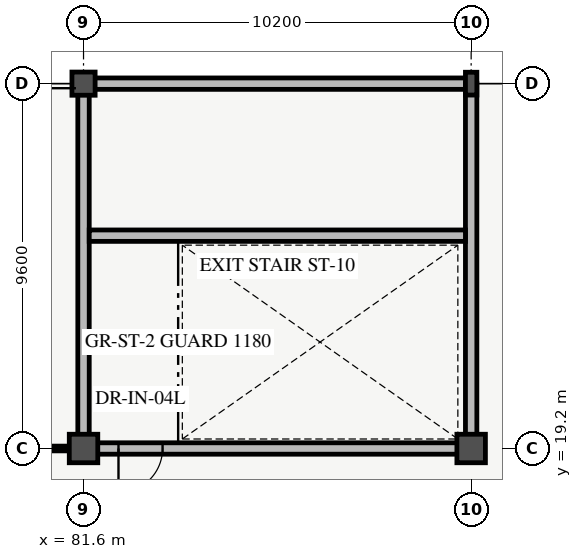
"""IFC4 building model, lengths in metres.
Left out: names, types, materials, properties, quantities, classifications, styles, units other than length and angle.
Written with IfcOpenShell. Run it as: python <this file> out.ifc"""

import sys

from ifc_helpers import new_model, si_unit, direction, frame, frame_2d, origin, origin_2d, place, context, subcontext, project, spatial, rectangle, hollow_circle, i_section, extrude, element, fill, save


model = new_model("IFC4")
c1 = context("Model", 3, precision=1e-05, world=origin(), true_north=direction((0.0, 1.0)))
c2 = subcontext(c1, "Body", "Model", "MODEL_VIEW")
j1 = project(units=[si_unit("LENGTHUNIT", "METRE"), si_unit("PLANEANGLEUNIT", "RADIAN")], contexts=[c1])
p1 = place(None, origin())
s1 = spatial("IfcSite", under=j1, at=p1, CompositionType="ELEMENT")
p2 = place(p1, origin())
s2 = spatial("IfcBuilding", under=s1, at=p2, CompositionType="ELEMENT")
p3 = place(p2, frame((0.0, 0.0, 10.8)))
s3 = spatial("IfcBuildingStorey", under=s2, at=p3, CompositionType="ELEMENT", Elevation=10.8)
p4 = place(p3, frame((81.6, 19.2, 0.0), z_axis=(0.0, 0.0, 1.0), x_axis=(1.0, 0.0, 0.0)))
e1 = element("IfcColumn", 1, at=p4, inside=s3, PredefinedType="COLUMN", context=c2, shape_type="SweptSolid", body=[
    extrude(rectangle(XDim=0.75, YDim=0.75, at=origin_2d()), origin(), (0.0, 0.0, 1.0), 4.2),
])
p5 = place(p3, frame((81.6, 28.8, 0.0), z_axis=(0.0, 0.0, 1.0), x_axis=(1.0, 0.0, 0.0)))
e2 = element("IfcColumn", 2, at=p5, inside=s3, PredefinedType="COLUMN", context=c2, shape_type="SweptSolid", body=[
    extrude(hollow_circle(Radius=0.305, WallThickness=0.025, at=origin_2d()), origin(), (0.0, 0.0, 1.0), 4.2),
])
p6 = place(p3, frame((91.8, 19.2, 0.0), z_axis=(0.0, 0.0, 1.0), x_axis=(1.0, 0.0, 0.0)))
e3 = element("IfcColumn", 3, at=p6, inside=s3, PredefinedType="COLUMN", context=c2, shape_type="SweptSolid", body=[
    extrude(rectangle(XDim=0.75, YDim=0.75, at=origin_2d()), origin(), (0.0, 0.0, 1.0), 4.2),
])
p7 = place(p3, frame((91.8, 28.8, 0.0), z_axis=(0.0, 0.0, 1.0), x_axis=(1.0, 0.0, 0.0)))
e4 = element("IfcColumn", 4, at=p7, inside=s3, PredefinedType="COLUMN", context=c2, shape_type="SweptSolid", body=[
    extrude(i_section(OverallWidth=0.3, OverallDepth=0.6, WebThickness=0.015, FlangeThickness=0.03, FilletRadius=0.027, at=origin_2d()), origin(), (0.0, 0.0, 1.0), 4.2),
])
p8 = place(p3, frame((81.6, 19.2, 0.0), z_axis=(0.0, 0.0, 1.0), x_axis=(1.0, 0.0, 0.0)))
e5 = element("IfcWall", 5, at=p8, inside=s3, PredefinedType="SHEAR", context=c2, shape_type="SweptSolid", body=[
    extrude(rectangle(XDim=10.2, YDim=0.3, at=frame_2d((5.1, 0.0))), origin(), (0.0, 0.0, 1.0), 4.2),
])
p9 = place(p8, frame((0.92, 0.0, 0.0)))
e6 = element("IfcOpeningElement", 6, at=p9, cuts=e5, PredefinedType="OPENING", context=c2, shape_type="SweptSolid", body=[
    extrude(rectangle(XDim=1.16, YDim=2.2, at=frame_2d((0.58, 1.1))), frame((0.0, 0.16, 0.0), z_axis=(0.0, -1.0, 0.0), x_axis=(1.0, 0.0, 0.0)), (0.0, 0.0, 1.0), 0.32),
])
p10 = place(p3, frame((81.6, 28.8, 0.0), z_axis=(0.0, 0.0, 1.0), x_axis=(1.0, 0.0, 0.0)))
e7 = element("IfcWall", 7, at=p10, inside=s3, PredefinedType="SHEAR", context=c2, shape_type="SweptSolid", body=[
    extrude(rectangle(XDim=10.2, YDim=0.3, at=frame_2d((5.1, 0.0))), origin(), (0.0, 0.0, 1.0), 4.2),
])
for number, where, z_axis, x_axis in (
    (8, (81.6, 19.2, 0.0), (0.0, 0.0, 1.0), (0.0, 1.0, 0.0)),
    (9, (91.8, 19.2, 0.0), (0.0, 0.0, 1.0), (0.0, 1.0, 0.0)),
):
    element("IfcWall", number, at=place(p3, frame(where, z_axis=z_axis, x_axis=x_axis)), inside=s3, PredefinedType="SHEAR", context=c2, shape_type="SweptSolid", body=[
        extrude(rectangle(XDim=9.6, YDim=0.3, at=frame_2d((4.8, 0.0))), origin(), (0.0, 0.0, 1.0), 4.2),
    ])
p11 = place(p3, frame((81.75, 24.8, 0.0), z_axis=(0.0, 0.0, 1.0), x_axis=(1.0, 0.0, 0.0)))
e10 = element("IfcWall", 10, at=p11, inside=s3, PredefinedType="SHEAR", context=c2, shape_type="SweptSolid", body=[
    extrude(rectangle(XDim=9.9, YDim=0.3, at=frame_2d((4.95, 0.0))), origin(), (0.0, 0.0, 1.0), 4.2),
])
p12 = place(p3, frame((71.8, 19.2, 0.0), z_axis=(0.0, 0.0, 1.0), x_axis=(1.0, 0.0, 0.0)))
e11 = element("IfcWall", 11, at=p12, inside=s3, PredefinedType="PARTITIONING", context=c2, shape_type="SweptSolid", body=[
    extrude(rectangle(XDim=9.4, YDim=0.125, at=frame_2d((4.7, 0.0))), origin(), (0.0, 0.0, 1.0), 3.06),
])
p13 = place(p12, frame((4.23, 0.0, 0.0)))
e12 = element("IfcOpeningElement", 12, at=p13, cuts=e11, PredefinedType="OPENING", context=c2, shape_type="SweptSolid", body=[
    extrude(rectangle(XDim=0.94, YDim=2.08, at=frame_2d((0.47, 1.04))), frame((0.0, 0.073, 0.0), z_axis=(0.0, -1.0, 0.0), x_axis=(1.0, 0.0, 0.0)), (0.0, 0.0, 1.0), 0.145),
])
p14 = place(p9, origin())
e13 = element("IfcDoor", 13, at=p14, inside=s3, OperationType="SINGLE_SWING_LEFT", PredefinedType="DOOR", context=c2, shape_type="SweptSolid", body=[
    extrude(rectangle(XDim=1.16, YDim=2.2, at=frame_2d((0.58, 1.1))), frame((0.0, 0.025, 0.0), z_axis=(0.0, -1.0, 0.0), x_axis=(1.0, 0.0, 0.0)), (0.0, 0.0, 1.0), 0.05),
])
fill(e6, e13)
save(model, sys.argv[1])
